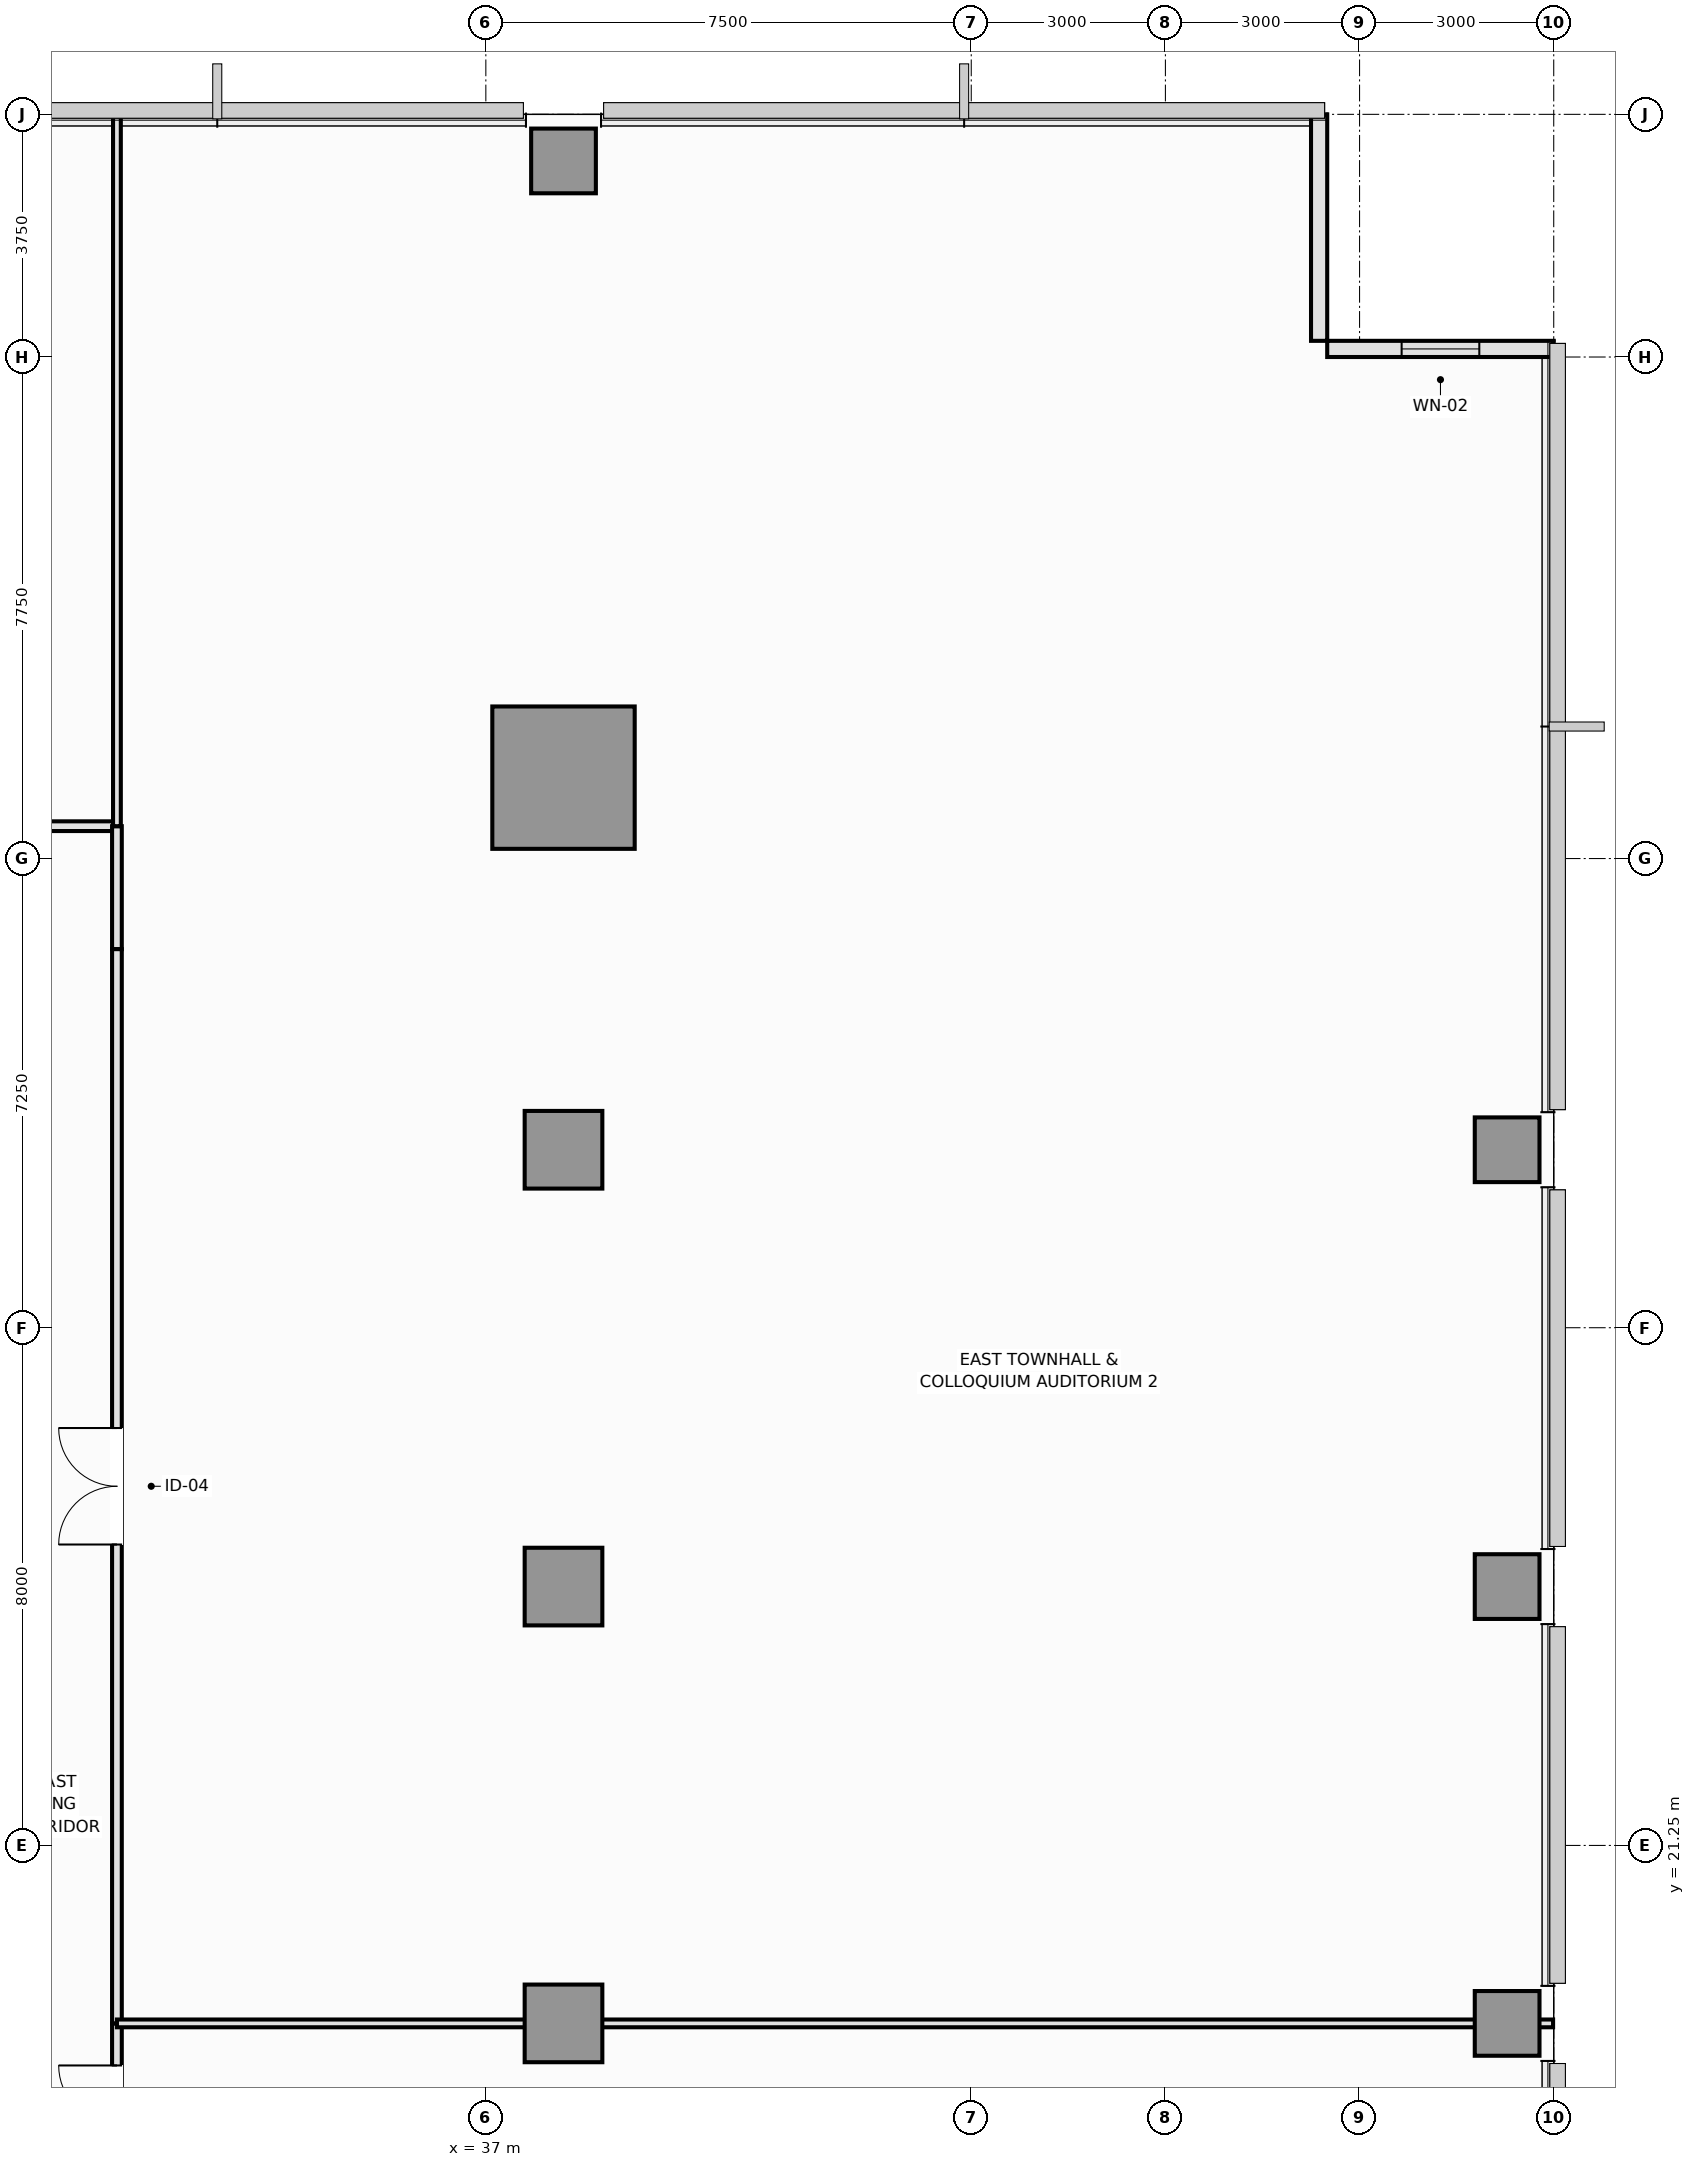
"""IFC4 building model, lengths in metres.
Left out: names, types, materials, properties, quantities, classifications, styles, units other than length and angle.
Written with IfcOpenShell. Run it as: python <this file> out.ifc"""

import sys

from ifc_helpers import new_model, si_unit, direction, frame, frame_2d, origin, origin_2d, place, context, subcontext, project, spatial, rectangle, extrude, element, fill, save


model = new_model("IFC4")
c1 = context("Model", 3, precision=1e-05, world=origin(), true_north=direction((0.0, 1.0)))
c2 = subcontext(c1, "Body", "Model", "MODEL_VIEW")
j1 = project(units=[si_unit("LENGTHUNIT", "METRE"), si_unit("PLANEANGLEUNIT", "RADIAN")], contexts=[c1])
p1 = place(None, origin())
s1 = spatial("IfcSite", under=j1, at=p1, CompositionType="ELEMENT")
p2 = place(p1, origin())
s2 = spatial("IfcBuilding", under=s1, at=p2, CompositionType="ELEMENT")
p3 = place(p2, frame((0.0, 0.0, 85.95)))
s3 = spatial("IfcBuildingStorey", under=s2, at=p3, CompositionType="ELEMENT", Elevation=85.95)
p4 = place(p3, frame((38.2, 37.75, 0.0), z_axis=(0.0, 0.0, 1.0), x_axis=(1.0, 0.0, 0.0)))
e1 = element("IfcColumn", 1, at=p4, inside=s3, PredefinedType="COLUMN", context=c2, shape_type="SweptSolid", body=[
    extrude(rectangle(XDim=2.2, YDim=2.2, at=origin_2d()), origin(), (0.0, 0.0, 1.0), 3.55),
])
for number, where, z_axis, x_axis in (
    (2, (38.2, 18.5, 0.0), (0.0, 0.0, 1.0), (1.0, 0.0, 0.0)),
    (3, (38.2, 25.25, 0.0), (0.0, 0.0, 1.0), (1.0, 0.0, 0.0)),
    (4, (38.2, 32.0, 0.0), (0.0, 0.0, 1.0), (1.0, 0.0, 0.0)),
):
    element("IfcColumn", number, at=place(p3, frame(where, z_axis=z_axis, x_axis=x_axis)), inside=s3, PredefinedType="COLUMN", context=c2, shape_type="SweptSolid", body=[
        extrude(rectangle(XDim=1.2, YDim=1.2, at=origin_2d()), origin(), (0.0, 0.0, 1.0), 3.55),
    ])
for number, where, z_axis, x_axis in (
    (5, (52.78, 18.5, 0.0), (0.0, 0.0, 1.0), (1.0, 0.0, 0.0)),
    (6, (52.78, 25.25, 0.0), (0.0, 0.0, 1.0), (1.0, 0.0, 0.0)),
    (7, (52.78, 32.0, 0.0), (0.0, 0.0, 1.0), (1.0, 0.0, 0.0)),
    (8, (38.2, 47.28, 0.0), (0.0, 0.0, 1.0), (1.0, 0.0, 0.0)),
):
    element("IfcColumn", number, at=place(p3, frame(where, z_axis=z_axis, x_axis=x_axis)), inside=s3, PredefinedType="COLUMN", context=c2, shape_type="SweptSolid", body=[
        extrude(rectangle(XDim=1.0, YDim=1.0, at=origin_2d()), origin(), (0.0, 0.0, 1.0), 3.55),
    ])
p5 = place(p3, frame((53.5, 44.375, 0.0), z_axis=(0.0, 0.0, 1.0), x_axis=(-1.0, 0.0, 0.0)))
e9 = element("IfcWall", 9, at=p5, inside=s3, PredefinedType="SOLIDWALL", context=c2, shape_type="SweptSolid", body=[
    extrude(rectangle(XDim=3.5, YDim=0.25, at=frame_2d((1.75, 0.0))), origin(), (0.0, 0.0, 1.0), 3.37),
])
p6 = place(p5, frame((1.15, 0.0, 0.9)))
e10 = element("IfcOpeningElement", 10, at=p6, cuts=e9, PredefinedType="OPENING", context=c2, shape_type="SweptSolid", body=[
    extrude(rectangle(XDim=1.2, YDim=1.8, at=frame_2d((0.6, 0.9))), frame((0.0, 0.135, 0.0), z_axis=(0.0, -1.0, 0.0), x_axis=(1.0, 0.0, 0.0)), (0.0, 0.0, 1.0), 0.27),
])
p7 = place(p3, frame((49.875, 44.5, 0.0), z_axis=(0.0, 0.0, 1.0), x_axis=(0.0, 1.0, 0.0)))
e11 = element("IfcWall", 11, at=p7, inside=s3, PredefinedType="SOLIDWALL", context=c2, shape_type="SweptSolid", body=[
    extrude(rectangle(XDim=3.5, YDim=0.25, at=frame_2d((1.75, 0.0))), origin(), (0.0, 0.0, 1.0), 3.37),
])
p8 = place(p3, frame((22.55, 37.0, 0.0), z_axis=(0.0, 0.0, 1.0), x_axis=(1.0, 0.0, 0.0)))
e12 = element("IfcWall", 12, at=p8, inside=s3, PredefinedType="PARTITIONING", context=c2, shape_type="SweptSolid", body=[
    extrude(rectangle(XDim=8.75, YDim=0.15, at=frame_2d((4.375, 0.0))), origin(), (0.0, 0.0, 1.0), 3.37),
])
p9 = place(p8, frame((2.988, 0.0, 0.0)))
e13 = element("IfcOpeningElement", 13, at=p9, cuts=e12, PredefinedType="OPENING", context=c2, shape_type="SweptSolid", body=[
    extrude(rectangle(XDim=1.0, YDim=2.15, at=frame_2d((0.5, 1.075))), frame((0.0, 0.085, 0.0), z_axis=(0.0, -1.0, 0.0), x_axis=(1.0, 0.0, 0.0)), (0.0, 0.0, 1.0), 0.17),
])
p10 = place(p3, frame((31.3, 35.1, 0.0), z_axis=(0.0, 0.0, 1.0), x_axis=(0.0, 1.0, 0.0)))
e14 = element("IfcWall", 14, at=p10, inside=s3, PredefinedType="PARTITIONING", context=c2, shape_type="SweptSolid", body=[
    extrude(rectangle(XDim=1.9, YDim=0.15, at=frame_2d((0.95, 0.0))), origin(), (0.0, 0.0, 1.0), 3.37),
])
p11 = place(p3, frame((31.3, 15.4, 0.0), z_axis=(0.0, 0.0, 1.0), x_axis=(0.0, 1.0, 0.0)))
e15 = element("IfcWall", 15, at=p11, inside=s3, PredefinedType="PARTITIONING", context=c2, shape_type="SweptSolid", body=[
    extrude(rectangle(XDim=3.1, YDim=0.15, at=frame_2d((1.55, 0.0))), origin(), (0.0, 0.0, 1.0), 3.37),
])
p12 = place(p11, frame((0.65, 0.0, 0.0)))
e16 = element("IfcOpeningElement", 16, at=p12, cuts=e15, PredefinedType="OPENING", context=c2, shape_type="SweptSolid", body=[
    extrude(rectangle(XDim=1.8, YDim=2.2, at=frame_2d((0.9, 1.1))), frame((0.0, 0.085, 0.0), z_axis=(0.0, -1.0, 0.0), x_axis=(1.0, 0.0, 0.0)), (0.0, 0.0, 1.0), 0.17),
])
p13 = place(p3, frame((31.3, 18.5, 0.0), z_axis=(0.0, 0.0, 1.0), x_axis=(0.0, 1.0, 0.0)))
e17 = element("IfcWall", 17, at=p13, inside=s3, PredefinedType="PARTITIONING", context=c2, shape_type="SweptSolid", body=[
    extrude(rectangle(XDim=16.6, YDim=0.15, at=frame_2d((8.3, 0.0))), origin(), (0.0, 0.0, 1.0), 3.37),
])
p14 = place(p13, frame((7.4, 0.0, 0.0)))
e18 = element("IfcOpeningElement", 18, at=p14, cuts=e17, PredefinedType="OPENING", context=c2, shape_type="SweptSolid", body=[
    extrude(rectangle(XDim=1.8, YDim=2.2, at=frame_2d((0.9, 1.1))), frame((0.0, 0.085, 0.0), z_axis=(0.0, -1.0, 0.0), x_axis=(1.0, 0.0, 0.0)), (0.0, 0.0, 1.0), 0.17),
])
p15 = place(p3, frame((31.3, 37.0, 0.0), z_axis=(0.0, 0.0, 1.0), x_axis=(0.0, 1.0, 0.0)))
e19 = element("IfcWall", 19, at=p15, inside=s3, PredefinedType="PARTITIONING", context=c2, shape_type="SweptSolid", body=[
    extrude(rectangle(XDim=10.99, YDim=0.12, at=frame_2d((5.495, 0.0))), origin(), (0.0, 0.0, 1.0), 3.37),
])
p16 = place(p3, frame((31.3, 18.5, 0.0), z_axis=(0.0, 0.0, 1.0), x_axis=(1.0, 0.0, 0.0)))
e20 = element("IfcWall", 20, at=p16, inside=s3, PredefinedType="PARTITIONING", context=c2, shape_type="SweptSolid", body=[
    extrude(rectangle(XDim=22.19, YDim=0.12, at=frame_2d((11.095, 0.0))), origin(), (0.0, 0.0, 1.0), 2.72),
])
p17 = place(p6, origin())
e21 = element("IfcWindow", 21, at=p17, inside=s3, PartitioningType="SINGLE_PANEL", PredefinedType="WINDOW", context=c2, shape_type="SweptSolid", body=[
    extrude(rectangle(XDim=1.2, YDim=1.8, at=frame_2d((0.6, 0.9))), frame((0.0, 0.03, 0.0), z_axis=(0.0, -1.0, 0.0), x_axis=(1.0, 0.0, 0.0)), (0.0, 0.0, 1.0), 0.06),
])
fill(e10, e21)
p18 = place(p12, origin())
e22 = element("IfcDoor", 22, at=p18, inside=s3, OperationType="DOUBLE_DOOR_SINGLE_SWING", PredefinedType="DOOR", context=c2, shape_type="SweptSolid", body=[
    extrude(rectangle(XDim=1.8, YDim=2.2, at=frame_2d((0.9, 1.1))), frame((0.0, 0.025, 0.0), z_axis=(0.0, -1.0, 0.0), x_axis=(1.0, 0.0, 0.0)), (0.0, 0.0, 1.0), 0.05),
])
fill(e16, e22)
p19 = place(p14, origin())
e23 = element("IfcDoor", 23, at=p19, inside=s3, OperationType="DOUBLE_DOOR_SINGLE_SWING", PredefinedType="DOOR", context=c2, shape_type="SweptSolid", body=[
    extrude(rectangle(XDim=1.8, YDim=2.2, at=frame_2d((0.9, 1.1))), frame((0.0, 0.025, 0.0), z_axis=(0.0, -1.0, 0.0), x_axis=(1.0, 0.0, 0.0)), (0.0, 0.0, 1.0), 0.05),
])
fill(e18, e23)
save(model, sys.argv[1])
